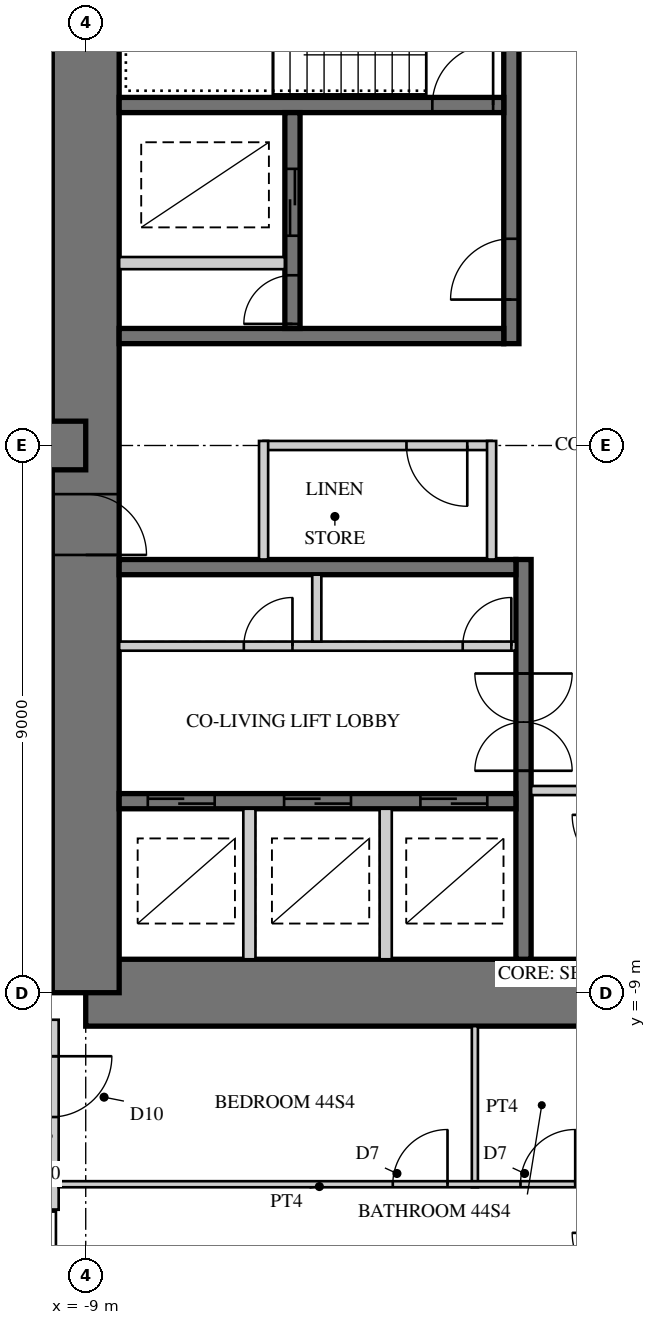
"""IFC4 building model, lengths in metres.
Left out: names, types, materials, properties, quantities, classifications, styles, units other than length and angle.
Written with IfcOpenShell. Run it as: python <this file> out.ifc"""

import sys

from ifc_helpers import new_model, si_unit, direction, frame, frame_2d, origin, place, context, subcontext, project, spatial, rectangle, hollow_rectangle, extrude, element, fill, save


model = new_model("IFC4")
c1 = context("Model", 3, precision=1e-05, world=origin(), true_north=direction((0.0, 1.0)))
c2 = subcontext(c1, "Body", "Model", "MODEL_VIEW")
j1 = project(units=[si_unit("LENGTHUNIT", "METRE"), si_unit("PLANEANGLEUNIT", "RADIAN")], contexts=[c1])
p1 = place(None, origin())
s1 = spatial("IfcSite", under=j1, at=p1, CompositionType="ELEMENT")
p2 = place(p1, origin())
s2 = spatial("IfcBuilding", under=s1, at=p2, CompositionType="ELEMENT")
p3 = place(p2, frame((0.0, 0.0, 179.7)))
s3 = spatial("IfcBuildingStorey", under=s2, at=p3, CompositionType="ELEMENT", Elevation=179.7)
p4 = place(p3, frame((-9.0, -9.0, 0.0), z_axis=(0.0, 0.0, 1.0), x_axis=(1.0, 0.0, 0.0)))
e1 = element("IfcWall", 1, at=p4, inside=s3, PredefinedType="SHEAR", context=c2, shape_type="SweptSolid", body=[
    extrude(rectangle(XDim=18.0, YDim=1.1, at=frame_2d((9.0, 0.0))), origin(), (0.0, 0.0, 1.0), 3.4),
])
p5 = place(p4, frame((9.8, 0.0, 0.0)))
e2 = element("IfcOpeningElement", 2, at=p5, cuts=e1, PredefinedType="OPENING", context=c2, shape_type="SweptSolid", body=[
    extrude(rectangle(XDim=1.0, YDim=2.4, at=frame_2d((0.5, 1.2))), frame((0.0, 0.56, 0.0), z_axis=(0.0, -1.0, 0.0), x_axis=(1.0, 0.0, 0.0)), (0.0, 0.0, 1.0), 1.12),
])
p6 = place(p3, frame((-9.0, 9.0, 0.0), z_axis=(0.0, 0.0, 1.0), x_axis=(0.0, -1.0, 0.0)))
e3 = element("IfcWall", 3, at=p6, inside=s3, PredefinedType="SHEAR", context=c2, shape_type="SweptSolid", body=[
    extrude(rectangle(XDim=18.0, YDim=1.1, at=frame_2d((9.0, 0.0))), origin(), (0.0, 0.0, 1.0), 3.4),
])
p7 = place(p6, frame((9.8, 0.0, 0.0)))
e4 = element("IfcOpeningElement", 4, at=p7, cuts=e3, PredefinedType="OPENING", context=c2, shape_type="SweptSolid", body=[
    extrude(rectangle(XDim=1.0, YDim=2.4, at=frame_2d((0.5, 1.2))), frame((0.0, 0.56, 0.0), z_axis=(0.0, -1.0, 0.0), x_axis=(1.0, 0.0, 0.0)), (0.0, 0.0, 1.0), 1.12),
])
p8 = place(p3, frame((-2.0, 1.675, 0.0), z_axis=(0.0, 0.0, 1.0), x_axis=(0.0, 1.0, 0.0)))
e5 = element("IfcWall", 5, at=p8, inside=s3, PredefinedType="SHEAR", context=c2, shape_type="SweptSolid", body=[
    extrude(rectangle(XDim=6.775, YDim=0.25, at=frame_2d((3.387, 0.0))), origin(), (0.0, 0.0, 1.0), 3.4),
])
p9 = place(p8, frame((0.725, 0.0, 0.0)))
e6 = element("IfcOpeningElement", 6, at=p9, cuts=e5, PredefinedType="OPENING", context=c2, shape_type="SweptSolid", body=[
    extrude(rectangle(XDim=1.0, YDim=2.1, at=frame_2d((0.5, 1.05))), frame((0.0, 0.135, 0.0), z_axis=(0.0, -1.0, 0.0), x_axis=(1.0, 0.0, 0.0)), (0.0, 0.0, 1.0), 0.27),
])
p10 = place(p3, frame((-2.125, 1.8, 0.0), z_axis=(0.0, 0.0, 1.0), x_axis=(-1.0, 0.0, 0.0)))
e7 = element("IfcWall", 7, at=p10, inside=s3, PredefinedType="SHEAR", context=c2, shape_type="SweptSolid", body=[
    extrude(rectangle(XDim=6.325, YDim=0.25, at=frame_2d((3.163, 0.0))), origin(), (0.0, 0.0, 1.0), 3.4),
])
p11 = place(p3, frame((-2.125, 5.6, 0.0), z_axis=(0.0, 0.0, 1.0), x_axis=(-1.0, 0.0, 0.0)))
e8 = element("IfcWall", 8, at=p11, inside=s3, PredefinedType="SHEAR", context=c2, shape_type="SweptSolid", body=[
    extrude(rectangle(XDim=6.325, YDim=0.25, at=frame_2d((3.163, 0.0))), origin(), (0.0, 0.0, 1.0), 3.4),
])
p12 = place(p11, frame((0.175, 0.0, 0.0)))
e9 = element("IfcOpeningElement", 9, at=p12, cuts=e8, PredefinedType="OPENING", context=c2, shape_type="SweptSolid", body=[
    extrude(rectangle(XDim=1.0, YDim=2.1, at=frame_2d((0.5, 1.05))), frame((0.0, 0.135, 0.0), z_axis=(0.0, -1.0, 0.0), x_axis=(1.0, 0.0, 0.0)), (0.0, 0.0, 1.0), 0.27),
])
p13 = place(p3, frame((-5.6, 1.925, 0.0), z_axis=(0.0, 0.0, 1.0), x_axis=(0.0, 1.0, 0.0)))
e10 = element("IfcWall", 10, at=p13, inside=s3, PredefinedType="SHEAR", context=c2, shape_type="SweptSolid", body=[
    extrude(rectangle(XDim=3.55, YDim=0.25, at=frame_2d((1.775, 0.0))), origin(), (0.0, 0.0, 1.0), 3.4),
])
p14 = place(p13, frame((1.525, 0.0, 0.0)))
e11 = element("IfcOpeningElement", 11, at=p14, cuts=e10, PredefinedType="OPENING", context=c2, shape_type="SweptSolid", body=[
    extrude(rectangle(XDim=1.1, YDim=2.2, at=frame_2d((0.55, 1.1))), frame((0.0, 0.135, 0.0), z_axis=(0.0, -1.0, 0.0), x_axis=(1.0, 0.0, 0.0)), (0.0, 0.0, 1.0), 0.27),
])
p15 = place(p13, frame((0.075, 0.0, 0.0)))
e12 = element("IfcOpeningElement", 12, at=p15, cuts=e10, PredefinedType="OPENING", context=c2, shape_type="SweptSolid", body=[
    extrude(rectangle(XDim=0.8, YDim=2.1, at=frame_2d((0.4, 1.05))), frame((0.0, 0.135, 0.0), z_axis=(0.0, -1.0, 0.0), x_axis=(1.0, 0.0, 0.0)), (0.0, 0.0, 1.0), 0.27),
])
p16 = place(p3, frame((-5.725, 3.0, 0.0), z_axis=(0.0, 0.0, 1.0), x_axis=(-1.0, 0.0, 0.0)))
e13 = element("IfcWall", 13, at=p16, inside=s3, PredefinedType="PARTITIONING", context=c2, shape_type="SweptSolid", body=[
    extrude(rectangle(XDim=2.725, YDim=0.2, at=frame_2d((1.362, 0.0))), origin(), (0.0, 0.0, 1.0), 3.4),
])
p17 = place(p3, frame((-1.8, -1.875, 0.0), z_axis=(0.0, 0.0, 1.0), x_axis=(0.0, -1.0, 0.0)))
e14 = element("IfcWall", 14, at=p17, inside=s3, PredefinedType="SHEAR", context=c2, shape_type="SweptSolid", body=[
    extrude(rectangle(XDim=6.575, YDim=0.25, at=frame_2d((3.288, 0.0))), origin(), (0.0, 0.0, 1.0), 3.4),
])
p18 = place(p17, frame((1.875, 0.0, 0.0)))
e15 = element("IfcOpeningElement", 15, at=p18, cuts=e14, PredefinedType="OPENING", context=c2, shape_type="SweptSolid", body=[
    extrude(rectangle(XDim=1.6, YDim=2.4, at=frame_2d((0.8, 1.2))), frame((0.0, 0.135, 0.0), z_axis=(0.0, -1.0, 0.0), x_axis=(1.0, 0.0, 0.0)), (0.0, 0.0, 1.0), 0.27),
])
p19 = place(p3, frame((-1.925, -2.0, 0.0), z_axis=(0.0, 0.0, 1.0), x_axis=(-1.0, 0.0, 0.0)))
e16 = element("IfcWall", 16, at=p19, inside=s3, PredefinedType="SHEAR", context=c2, shape_type="SweptSolid", body=[
    extrude(rectangle(XDim=6.525, YDim=0.25, at=frame_2d((3.262, 0.0))), origin(), (0.0, 0.0, 1.0), 3.4),
])
p20 = place(p3, frame((-1.925, -5.85, 0.0), z_axis=(0.0, 0.0, 1.0), x_axis=(-1.0, 0.0, 0.0)))
e17 = element("IfcWall", 17, at=p20, inside=s3, PredefinedType="SHEAR", context=c2, shape_type="SweptSolid", body=[
    extrude(rectangle(XDim=6.525, YDim=0.25, at=frame_2d((3.262, 0.0))), origin(), (0.0, 0.0, 1.0), 3.4),
])
p21 = place(p20, frame((0.471, 0.0, 0.0)))
e18 = element("IfcOpeningElement", 18, at=p21, cuts=e17, PredefinedType="OPENING", context=c2, shape_type="SweptSolid", body=[
    extrude(rectangle(XDim=1.1, YDim=2.2, at=frame_2d((0.55, 1.1))), frame((0.0, 0.135, 0.0), z_axis=(0.0, -1.0, 0.0), x_axis=(1.0, 0.0, 0.0)), (0.0, 0.0, 1.0), 0.27),
])
p22 = place(p20, frame((2.712, 0.0, 0.0)))
e19 = element("IfcOpeningElement", 19, at=p22, cuts=e17, PredefinedType="OPENING", context=c2, shape_type="SweptSolid", body=[
    extrude(rectangle(XDim=1.1, YDim=2.2, at=frame_2d((0.55, 1.1))), frame((0.0, 0.135, 0.0), z_axis=(0.0, -1.0, 0.0), x_axis=(1.0, 0.0, 0.0)), (0.0, 0.0, 1.0), 0.27),
])
p23 = place(p20, frame((4.954, 0.0, 0.0)))
e20 = element("IfcOpeningElement", 20, at=p23, cuts=e17, PredefinedType="OPENING", context=c2, shape_type="SweptSolid", body=[
    extrude(rectangle(XDim=1.1, YDim=2.2, at=frame_2d((0.55, 1.1))), frame((0.0, 0.135, 0.0), z_axis=(0.0, -1.0, 0.0), x_axis=(1.0, 0.0, 0.0)), (0.0, 0.0, 1.0), 0.27),
])
p24 = place(p3, frame((-1.925, -3.3, 0.0), z_axis=(0.0, 0.0, 1.0), x_axis=(-1.0, 0.0, 0.0)))
e21 = element("IfcWall", 21, at=p24, inside=s3, PredefinedType="PARTITIONING", context=c2, shape_type="SweptSolid", body=[
    extrude(rectangle(XDim=6.525, YDim=0.15, at=frame_2d((3.262, 0.0))), origin(), (0.0, 0.0, 1.0), 3.4),
])
p25 = place(p24, frame((0.075, 0.0, 0.0)))
e22 = element("IfcOpeningElement", 22, at=p25, cuts=e21, PredefinedType="OPENING", context=c2, shape_type="SweptSolid", body=[
    extrude(rectangle(XDim=0.8, YDim=2.1, at=frame_2d((0.4, 1.05))), frame((0.0, 0.085, 0.0), z_axis=(0.0, -1.0, 0.0), x_axis=(1.0, 0.0, 0.0)), (0.0, 0.0, 1.0), 0.17),
])
p26 = place(p24, frame((3.675, 0.0, 0.0)))
e23 = element("IfcOpeningElement", 23, at=p26, cuts=e21, PredefinedType="OPENING", context=c2, shape_type="SweptSolid", body=[
    extrude(rectangle(XDim=0.8, YDim=2.1, at=frame_2d((0.4, 1.05))), frame((0.0, 0.085, 0.0), z_axis=(0.0, -1.0, 0.0), x_axis=(1.0, 0.0, 0.0)), (0.0, 0.0, 1.0), 0.17),
])
p27 = place(p3, frame((-5.2, -2.125, 0.0), z_axis=(0.0, 0.0, 1.0), x_axis=(0.0, -1.0, 0.0)))
e24 = element("IfcWall", 24, at=p27, inside=s3, PredefinedType="PARTITIONING", context=c2, shape_type="SweptSolid", body=[
    extrude(rectangle(XDim=1.1, YDim=0.15, at=frame_2d((0.55, 0.0))), origin(), (0.0, 0.0, 1.0), 3.4),
])
for number, where, z_axis, x_axis in (
    (25, (-4.067, -5.975, 0.0), (0.0, 0.0, 1.0), (0.0, -1.0, 0.0)),
    (26, (-6.308, -5.975, 0.0), (0.0, 0.0, 1.0), (0.0, -1.0, 0.0)),
):
    element("IfcWall", number, at=place(p3, frame(where, z_axis=z_axis, x_axis=x_axis)), inside=s3, PredefinedType="PARTITIONING", context=c2, shape_type="SweptSolid", body=[
        extrude(rectangle(XDim=2.475, YDim=0.2, at=frame_2d((1.237, 0.0))), origin(), (0.0, 0.0, 1.0), 3.4),
    ])
p28 = place(p3, frame((-9.0, 0.0, 0.0), z_axis=(0.0, 0.0, 1.0), x_axis=(-1.0, 0.0, 0.0)))
e27 = element("IfcWall", 27, at=p28, inside=s3, PredefinedType="SHEAR", context=c2, shape_type="SweptSolid", body=[
    extrude(rectangle(XDim=18.0, YDim=0.8, at=frame_2d((9.0, 0.0))), origin(), (0.0, 0.0, 1.0), 3.4),
])
p29 = place(p28, frame((3.95, 0.0, 0.0)))
e28 = element("IfcOpeningElement", 28, at=p29, cuts=e27, PredefinedType="OPENING", context=c2, shape_type="SweptSolid", body=[
    extrude(rectangle(XDim=1.0, YDim=2.15, at=frame_2d((0.5, 1.075))), frame((0.0, 0.41, 0.0), z_axis=(0.0, -1.0, 0.0), x_axis=(1.0, 0.0, 0.0)), (0.0, 0.0, 1.0), 0.82),
])
p30 = place(p28, frame((6.6, 0.0, 0.0)))
e29 = element("IfcOpeningElement", 29, at=p30, cuts=e27, PredefinedType="OPENING", context=c2, shape_type="SweptSolid", body=[
    extrude(rectangle(XDim=1.0, YDim=2.15, at=frame_2d((0.5, 1.075))), frame((0.0, 0.41, 0.0), z_axis=(0.0, -1.0, 0.0), x_axis=(1.0, 0.0, 0.0)), (0.0, 0.0, 1.0), 0.82),
])
p31 = place(p28, frame((13.25, 0.0, 0.0)))
e30 = element("IfcOpeningElement", 30, at=p31, cuts=e27, PredefinedType="OPENING", context=c2, shape_type="SweptSolid", body=[
    extrude(rectangle(XDim=1.0, YDim=2.2, at=frame_2d((0.5, 1.1))), frame((0.0, 0.41, 0.0), z_axis=(0.0, -1.0, 0.0), x_axis=(1.0, 0.0, 0.0)), (0.0, 0.0, 1.0), 0.82),
])
p32 = place(p3, frame((-9.57, -9.445, 0.0), z_axis=(0.0, 0.0, 1.0), x_axis=(0.0, -1.0, 0.0)))
e31 = element("IfcWall", 31, at=p32, inside=s3, PredefinedType="SOLIDWALL", context=c2, shape_type="SweptSolid", body=[
    extrude(rectangle(XDim=3.125, YDim=0.25, at=frame_2d((1.562, 0.0))), origin(), (0.0, 0.0, 1.0), 3.22),
])
p33 = place(p32, frame((0.6, 0.0, 0.0)))
e32 = element("IfcOpeningElement", 32, at=p33, cuts=e31, PredefinedType="OPENING", context=c2, shape_type="SweptSolid", body=[
    extrude(rectangle(XDim=1.0, YDim=2.2, at=frame_2d((0.5, 1.1))), frame((0.0, 0.135, 0.0), z_axis=(0.0, -1.0, 0.0), x_axis=(1.0, 0.0, 0.0)), (0.0, 0.0, 1.0), 0.27),
])
p34 = place(p3, frame((-2.325, 0.0, 0.0), z_axis=(0.0, 0.0, 1.0), x_axis=(-1.0, 0.0, 0.0)))
e33 = element("IfcWall", 33, at=p34, inside=s3, PredefinedType="PARTITIONING", context=c2, shape_type="SweptSolid", body=[
    extrude(rectangle(XDim=3.75, YDim=0.15, at=frame_2d((1.875, 0.0))), origin(), (0.0, 0.0, 1.0), 3.22),
])
p35 = place(p34, frame((0.4, 0.0, 0.0)))
e34 = element("IfcOpeningElement", 34, at=p35, cuts=e33, PredefinedType="OPENING", context=c2, shape_type="SweptSolid", body=[
    extrude(rectangle(XDim=1.0, YDim=2.1, at=frame_2d((0.5, 1.05))), frame((0.0, 0.085, 0.0), z_axis=(0.0, -1.0, 0.0), x_axis=(1.0, 0.0, 0.0)), (0.0, 0.0, 1.0), 0.17),
])
for number, where, z_axis, x_axis in (
    (35, (-2.325, -1.875, 0.0), (0.0, 0.0, 1.0), (0.0, 1.0, 0.0)),
    (36, (-6.075, 0.075, 0.0), (0.0, 0.0, 1.0), (0.0, -1.0, 0.0)),
):
    element("IfcWall", number, at=place(p3, frame(where, z_axis=z_axis, x_axis=x_axis)), inside=s3, PredefinedType="PARTITIONING", context=c2, shape_type="SweptSolid", body=[
        extrude(rectangle(XDim=1.95, YDim=0.15, at=frame_2d((0.975, 0.0))), origin(), (0.0, 0.0, 1.0), 3.22),
    ])
p36 = place(p3, frame((-1.675, -5.675, 0.0), z_axis=(0.0, 0.0, 1.0), x_axis=(1.0, 0.0, 0.0)))
e37 = element("IfcWall", 37, at=p36, inside=s3, PredefinedType="PARTITIONING", context=c2, shape_type="SweptSolid", body=[
    extrude(rectangle(XDim=1.75, YDim=0.15, at=frame_2d((0.875, 0.0))), origin(), (0.0, 0.0, 1.0), 3.22),
])
p37 = place(p3, frame((-2.6, -9.55, 0.0), z_axis=(0.0, 0.0, 1.0), x_axis=(0.0, -1.0, 0.0)))
e38 = element("IfcWall", 38, at=p37, inside=s3, PredefinedType="PARTITIONING", context=c2, shape_type="SweptSolid", body=[
    extrude(rectangle(XDim=2.65, YDim=0.1, at=frame_2d((1.325, 0.0))), origin(), (0.0, 0.0, 1.0), 3.22),
])
p38 = place(p3, frame((-9.445, -12.15, 0.0), z_axis=(0.0, 0.0, 1.0), x_axis=(1.0, 0.0, 0.0)))
e39 = element("IfcWall", 39, at=p38, inside=s3, PredefinedType="PARTITIONING", context=c2, shape_type="SweptSolid", body=[
    extrude(rectangle(XDim=9.045, YDim=0.1, at=frame_2d((4.522, 0.0))), origin(), (0.0, 0.0, 1.0), 3.22),
])
p39 = place(p38, frame((5.495, 0.0, 0.0)))
e40 = element("IfcOpeningElement", 40, at=p39, cuts=e39, PredefinedType="OPENING", context=c2, shape_type="SweptSolid", body=[
    extrude(rectangle(XDim=0.9, YDim=2.1, at=frame_2d((0.45, 1.05))), frame((0.0, 0.06, 0.0), z_axis=(0.0, -1.0, 0.0), x_axis=(1.0, 0.0, 0.0)), (0.0, 0.0, 1.0), 0.12),
])
p40 = place(p38, frame((7.595, 0.0, 0.0)))
e41 = element("IfcOpeningElement", 41, at=p40, cuts=e39, PredefinedType="OPENING", context=c2, shape_type="SweptSolid", body=[
    extrude(rectangle(XDim=0.9, YDim=2.1, at=frame_2d((0.45, 1.05))), frame((0.0, 0.06, 0.0), z_axis=(0.0, -1.0, 0.0), x_axis=(1.0, 0.0, 0.0)), (0.0, 0.0, 1.0), 0.12),
])
p41 = place(p3, frame((-9.55, -4.775, 0.0), z_axis=(0.0, 0.0, 1.0), x_axis=(-1.0, 0.0, 0.0)))
e42 = element("IfcWall", 42, at=p41, inside=s3, PredefinedType="PARTITIONING", context=c2, shape_type="SweptSolid", body=[
    extrude(rectangle(XDim=3.1, YDim=0.1, at=frame_2d((1.55, 0.0))), origin(), (0.0, 0.0, 1.0), 3.22),
])
p42 = place(p33, origin())
e43 = element("IfcDoor", 43, at=p42, inside=s3, OperationType="SINGLE_SWING_LEFT", PredefinedType="DOOR", context=c2, shape_type="SweptSolid", body=[
    extrude(hollow_rectangle(XDim=1.0, YDim=2.2, WallThickness=0.06, at=frame_2d((0.5, 1.1))), frame((0.0, 0.025, 0.0), z_axis=(0.0, -1.0, 0.0), x_axis=(1.0, 0.0, 0.0)), (0.0, 0.0, 1.0), 0.05),
    extrude(rectangle(XDim=0.879, YDim=2.079, at=frame_2d((0.5, 1.1))), frame((0.0, 0.025, 0.0), z_axis=(0.0, -1.0, 0.0), x_axis=(1.0, 0.0, 0.0)), (0.0, 0.0, 1.0), 0.05),
])
fill(e32, e43)
p43 = place(p35, origin())
e44 = element("IfcDoor", 44, at=p43, inside=s3, OperationType="SINGLE_SWING_LEFT", PredefinedType="DOOR", context=c2, shape_type="SweptSolid", body=[
    extrude(rectangle(XDim=1.0, YDim=2.1, at=frame_2d((0.5, 1.05))), frame((0.0, 0.025, 0.0), z_axis=(0.0, -1.0, 0.0), x_axis=(1.0, 0.0, 0.0)), (0.0, 0.0, 1.0), 0.05),
])
fill(e34, e44)
p44 = place(p39, origin())
e45 = element("IfcDoor", 45, at=p44, inside=s3, OperationType="SINGLE_SWING_RIGHT", PredefinedType="DOOR", context=c2, shape_type="SweptSolid", body=[
    extrude(rectangle(XDim=0.9, YDim=2.1, at=frame_2d((0.45, 1.05))), frame((0.0, 0.025, 0.0), z_axis=(0.0, -1.0, 0.0), x_axis=(1.0, 0.0, 0.0)), (0.0, 0.0, 1.0), 0.05),
])
fill(e40, e45)
p45 = place(p40, origin())
e46 = element("IfcDoor", 46, at=p45, inside=s3, OperationType="SINGLE_SWING_RIGHT", PredefinedType="DOOR", context=c2, shape_type="SweptSolid", body=[
    extrude(rectangle(XDim=0.9, YDim=2.1, at=frame_2d((0.45, 1.05))), frame((0.0, 0.025, 0.0), z_axis=(0.0, -1.0, 0.0), x_axis=(1.0, 0.0, 0.0)), (0.0, 0.0, 1.0), 0.05),
])
fill(e41, e46)
p46 = place(p7, origin())
e47 = element("IfcDoor", 47, at=p46, inside=s3, OperationType="SINGLE_SWING_RIGHT", PredefinedType="DOOR", context=c2, shape_type="SweptSolid", body=[
    extrude(rectangle(XDim=1.0, YDim=2.4, at=frame_2d((0.5, 1.2))), frame((0.0, 0.055, 0.0), z_axis=(0.0, -1.0, 0.0), x_axis=(1.0, 0.0, 0.0)), (0.0, 0.0, 1.0), 0.05),
])
fill(e4, e47)
p47 = place(p9, origin())
e48 = element("IfcDoor", 48, at=p47, inside=s3, OperationType="SINGLE_SWING_LEFT", PredefinedType="DOOR", context=c2, shape_type="SweptSolid", body=[
    extrude(rectangle(XDim=1.0, YDim=2.1, at=frame_2d((0.5, 1.05))), frame((0.0, 0.025, 0.0), z_axis=(0.0, -1.0, 0.0), x_axis=(1.0, 0.0, 0.0)), (0.0, 0.0, 1.0), 0.05),
])
fill(e6, e48)
p48 = place(p12, frame((1.0, 0.0, 0.0), z_axis=(0.0, 0.0, 1.0), x_axis=(-1.0, 0.0, 0.0)))
e49 = element("IfcDoor", 49, at=p48, inside=s3, OperationType="SINGLE_SWING_RIGHT", PredefinedType="DOOR", context=c2, shape_type="SweptSolid", body=[
    extrude(rectangle(XDim=1.0, YDim=2.1, at=frame_2d((0.5, 1.05))), frame((0.0, 0.025, 0.0), z_axis=(0.0, -1.0, 0.0), x_axis=(1.0, 0.0, 0.0)), (0.0, 0.0, 1.0), 0.05),
])
fill(e9, e49)
p49 = place(p14, origin())
e50 = element("IfcDoor", 50, at=p49, inside=s3, OperationType="DOUBLE_DOOR_SLIDING", PredefinedType="DOOR", context=c2, shape_type="SweptSolid", body=[
    extrude(rectangle(XDim=1.1, YDim=2.2, at=frame_2d((0.55, 1.1))), frame((0.0, 0.025, 0.0), z_axis=(0.0, -1.0, 0.0), x_axis=(1.0, 0.0, 0.0)), (0.0, 0.0, 1.0), 0.05),
])
fill(e11, e50)
p50 = place(p15, origin())
e51 = element("IfcDoor", 51, at=p50, inside=s3, OperationType="SINGLE_SWING_LEFT", PredefinedType="DOOR", context=c2, shape_type="SweptSolid", body=[
    extrude(rectangle(XDim=0.8, YDim=2.1, at=frame_2d((0.4, 1.05))), frame((0.0, 0.025, 0.0), z_axis=(0.0, -1.0, 0.0), x_axis=(1.0, 0.0, 0.0)), (0.0, 0.0, 1.0), 0.05),
])
fill(e12, e51)
p51 = place(p21, origin())
e52 = element("IfcDoor", 52, at=p51, inside=s3, OperationType="DOUBLE_DOOR_SLIDING", PredefinedType="DOOR", context=c2, shape_type="SweptSolid", body=[
    extrude(rectangle(XDim=1.1, YDim=2.2, at=frame_2d((0.55, 1.1))), frame((0.0, 0.025, 0.0), z_axis=(0.0, -1.0, 0.0), x_axis=(1.0, 0.0, 0.0)), (0.0, 0.0, 1.0), 0.05),
])
fill(e18, e52)
p52 = place(p22, origin())
e53 = element("IfcDoor", 53, at=p52, inside=s3, OperationType="DOUBLE_DOOR_SLIDING", PredefinedType="DOOR", context=c2, shape_type="SweptSolid", body=[
    extrude(rectangle(XDim=1.1, YDim=2.2, at=frame_2d((0.55, 1.1))), frame((0.0, 0.025, 0.0), z_axis=(0.0, -1.0, 0.0), x_axis=(1.0, 0.0, 0.0)), (0.0, 0.0, 1.0), 0.05),
])
fill(e19, e53)
p53 = place(p23, origin())
e54 = element("IfcDoor", 54, at=p53, inside=s3, OperationType="DOUBLE_DOOR_SLIDING", PredefinedType="DOOR", context=c2, shape_type="SweptSolid", body=[
    extrude(rectangle(XDim=1.1, YDim=2.2, at=frame_2d((0.55, 1.1))), frame((0.0, 0.025, 0.0), z_axis=(0.0, -1.0, 0.0), x_axis=(1.0, 0.0, 0.0)), (0.0, 0.0, 1.0), 0.05),
])
fill(e20, e54)
p54 = place(p18, origin())
e55 = element("IfcDoor", 55, at=p54, inside=s3, OperationType="DOUBLE_DOOR_DOUBLE_SWING", PredefinedType="DOOR", context=c2, shape_type="SweptSolid", body=[
    extrude(rectangle(XDim=1.6, YDim=2.4, at=frame_2d((0.8, 1.2))), frame((0.0, 0.025, 0.0), z_axis=(0.0, -1.0, 0.0), x_axis=(1.0, 0.0, 0.0)), (0.0, 0.0, 1.0), 0.05),
])
fill(e15, e55)
p55 = place(p25, frame((0.8, 0.0, 0.0), z_axis=(0.0, 0.0, 1.0), x_axis=(-1.0, 0.0, 0.0)))
e56 = element("IfcDoor", 56, at=p55, inside=s3, OperationType="SINGLE_SWING_RIGHT", PredefinedType="DOOR", context=c2, shape_type="SweptSolid", body=[
    extrude(rectangle(XDim=0.8, YDim=2.1, at=frame_2d((0.4, 1.05))), frame((0.0, 0.025, 0.0), z_axis=(0.0, -1.0, 0.0), x_axis=(1.0, 0.0, 0.0)), (0.0, 0.0, 1.0), 0.05),
])
fill(e22, e56)
p56 = place(p26, frame((0.8, 0.0, 0.0), z_axis=(0.0, 0.0, 1.0), x_axis=(-1.0, 0.0, 0.0)))
e57 = element("IfcDoor", 57, at=p56, inside=s3, OperationType="SINGLE_SWING_RIGHT", PredefinedType="DOOR", context=c2, shape_type="SweptSolid", body=[
    extrude(rectangle(XDim=0.8, YDim=2.1, at=frame_2d((0.4, 1.05))), frame((0.0, 0.025, 0.0), z_axis=(0.0, -1.0, 0.0), x_axis=(1.0, 0.0, 0.0)), (0.0, 0.0, 1.0), 0.05),
])
fill(e23, e57)
save(model, sys.argv[1])
